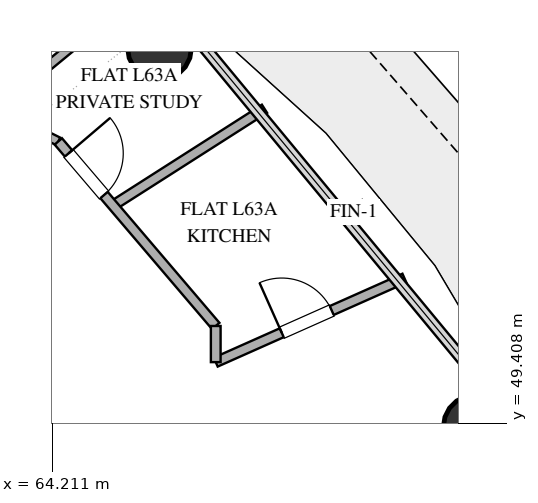
"""IFC4 building model, lengths in metres.
Left out: names, types, materials, properties, quantities, classifications, styles, units other than length and angle.
Written with IfcOpenShell. Run it as: python <this file> out.ifc"""

import sys

from ifc_helpers import new_model, si_unit, direction, frame, frame_2d, origin, origin_2d, place, context, subcontext, project, spatial, rectangle, hollow_circle, extrude, element, fill, save


model = new_model("IFC4")
c1 = context("Model", 3, precision=1e-05, world=origin(), true_north=direction((0.0, 1.0)))
c2 = subcontext(c1, "Body", "Model", "MODEL_VIEW")
j1 = project(units=[si_unit("LENGTHUNIT", "METRE"), si_unit("PLANEANGLEUNIT", "RADIAN")], contexts=[c1])
p1 = place(None, origin())
s1 = spatial("IfcSite", under=j1, at=p1, CompositionType="ELEMENT")
p2 = place(p1, origin())
s2 = spatial("IfcBuilding", under=s1, at=p2, CompositionType="ELEMENT")
p3 = place(p2, frame((0.0, 0.0, 246.0)))
s3 = spatial("IfcBuildingStorey", under=s2, at=p3, CompositionType="ELEMENT", Elevation=246.0)
for number, where, z_axis, x_axis in (
    (1, (71.169, 49.347, 0.0), (0.0, 0.0, 1.0), (1.0, 0.0, 0.0)),
    (2, (65.975, 55.576, 0.0), (0.0, 0.0, 1.0), (1.0, 0.0, 0.0)),
):
    element("IfcColumn", number, at=place(p3, frame(where, z_axis=z_axis, x_axis=x_axis)), inside=s3, PredefinedType="COLUMN", context=c2, shape_type="SweptSolid", body=[
        extrude(hollow_circle(Radius=0.525, WallThickness=0.028, at=origin_2d()), origin(), (0.0, 0.0, 1.0), 3.36),
    ])
p4 = place(p3, frame((58.964, 56.7, 0.0), z_axis=(0.0, 0.0, 1.0), x_axis=(0.895471406875, -0.445119039661, 0.0)))
e3 = element("IfcWall", 3, at=p4, inside=s3, PredefinedType="PARTITIONING", context=c2, shape_type="SweptSolid", body=[
    extrude(rectangle(XDim=5.971, YDim=0.14, at=frame_2d((2.986, 0.0))), origin(), (0.0, 0.0, 1.0), 2.72),
])
p5 = place(p4, frame((2.616, 0.0, 0.0)))
e4 = element("IfcOpeningElement", 4, at=p5, cuts=e3, PredefinedType="OPENING", context=c2, shape_type="SweptSolid", body=[
    extrude(rectangle(XDim=0.9, YDim=2.1, at=frame_2d((0.45, 1.05))), frame((0.0, 0.08, 0.0), z_axis=(0.0, -1.0, 0.0), x_axis=(1.0, 0.0, 0.0)), (0.0, 0.0, 1.0), 0.16),
])
p6 = place(p3, frame((66.9, 50.412, 0.0), z_axis=(0.0, 0.0, 1.0), x_axis=(0.91359503784, 0.406625265858, 0.0)))
e5 = element("IfcWall", 5, at=p6, inside=s3, PredefinedType="PLUMBINGWALL", context=c2, shape_type="SweptSolid", body=[
    extrude(rectangle(XDim=3.396, YDim=0.16, at=frame_2d((1.698, 0.0))), origin(), (0.0, 0.0, 1.0), 2.72),
])
p7 = place(p6, frame((1.188, 0.0, 0.0)))
e6 = element("IfcOpeningElement", 6, at=p7, cuts=e5, PredefinedType="OPENING", context=c2, shape_type="SweptSolid", body=[
    extrude(rectangle(XDim=0.9, YDim=2.1, at=frame_2d((0.45, 1.05))), frame((0.0, 0.09, 0.0), z_axis=(0.0, -1.0, 0.0), x_axis=(1.0, 0.0, 0.0)), (0.0, 0.0, 1.0), 0.18),
])
p8 = place(p3, frame((65.622, 56.5, 0.0), z_axis=(0.0, 0.0, 1.0), x_axis=(-0.772175042734, -0.635409870381, 0.0)))
e7 = element("IfcWall", 7, at=p8, inside=s3, PredefinedType="PARTITIONING", context=c2, shape_type="SweptSolid", body=[
    extrude(rectangle(XDim=3.051, YDim=0.15, at=frame_2d((1.525, 0.0))), origin(), (0.0, 0.0, 1.0), 2.72),
])
p9 = place(p3, frame((65.21, 52.988, 0.0), z_axis=(0.0, 0.0, 1.0), x_axis=(0.842827369803, 0.538184006369, 0.0)))
e8 = element("IfcWall", 8, at=p9, inside=s3, PredefinedType="PLUMBINGWALL", context=c2, shape_type="SweptSolid", body=[
    extrude(rectangle(XDim=2.956, YDim=0.16, at=frame_2d((1.478, 0.0))), origin(), (0.0, 0.0, 1.0), 2.72),
])
p10 = place(p3, frame((64.311, 54.042, 0.0), z_axis=(0.0, 0.0, 1.0), x_axis=(0.648985159088, -0.760801066826, 0.0)))
e9 = element("IfcWall", 9, at=p10, inside=s3, PredefinedType="PLUMBINGWALL", context=c2, shape_type="SweptSolid", body=[
    extrude(rectangle(XDim=3.989, YDim=0.16, at=frame_2d((1.995, 0.0))), origin(), (0.0, 0.0, 1.0), 2.72),
])
p11 = place(p10, frame((0.259, 0.0, 0.0)))
e10 = element("IfcOpeningElement", 10, at=p11, cuts=e9, PredefinedType="OPENING", context=c2, shape_type="SweptSolid", body=[
    extrude(rectangle(XDim=0.9, YDim=2.1, at=frame_2d((0.45, 1.05))), frame((0.0, 0.09, 0.0), z_axis=(0.0, -1.0, 0.0), x_axis=(1.0, 0.0, 0.0)), (0.0, 0.0, 1.0), 0.18),
])
p12 = place(p3, frame((66.9, 51.007, 0.0), z_axis=(0.0, 0.0, 1.0), x_axis=(0.0, -1.0, 0.0)))
e11 = element("IfcWall", 11, at=p12, inside=s3, PredefinedType="PLUMBINGWALL", context=c2, shape_type="SweptSolid", body=[
    extrude(rectangle(XDim=0.595, YDim=0.16, at=frame_2d((0.297, 0.0))), origin(), (0.0, 0.0, 1.0), 2.72),
])
p13 = place(p7, origin())
e12 = element("IfcDoor", 12, at=p13, inside=s3, OperationType="SINGLE_SWING_LEFT", PredefinedType="DOOR", context=c2, shape_type="SweptSolid", body=[
    extrude(rectangle(XDim=0.9, YDim=2.1, at=frame_2d((0.45, 1.05))), frame((0.0, 0.025, 0.0), z_axis=(0.0, -1.0, 0.0), x_axis=(1.0, 0.0, 0.0)), (0.0, 0.0, 1.0), 0.05),
])
fill(e6, e12)
p14 = place(p11, origin())
e13 = element("IfcDoor", 13, at=p14, inside=s3, OperationType="SINGLE_SWING_LEFT", PredefinedType="DOOR", context=c2, shape_type="SweptSolid", body=[
    extrude(rectangle(XDim=0.9, YDim=2.1, at=frame_2d((0.45, 1.05))), frame((0.0, 0.025, 0.0), z_axis=(0.0, -1.0, 0.0), x_axis=(1.0, 0.0, 0.0)), (0.0, 0.0, 1.0), 0.05),
])
fill(e10, e13)
save(model, sys.argv[1])
